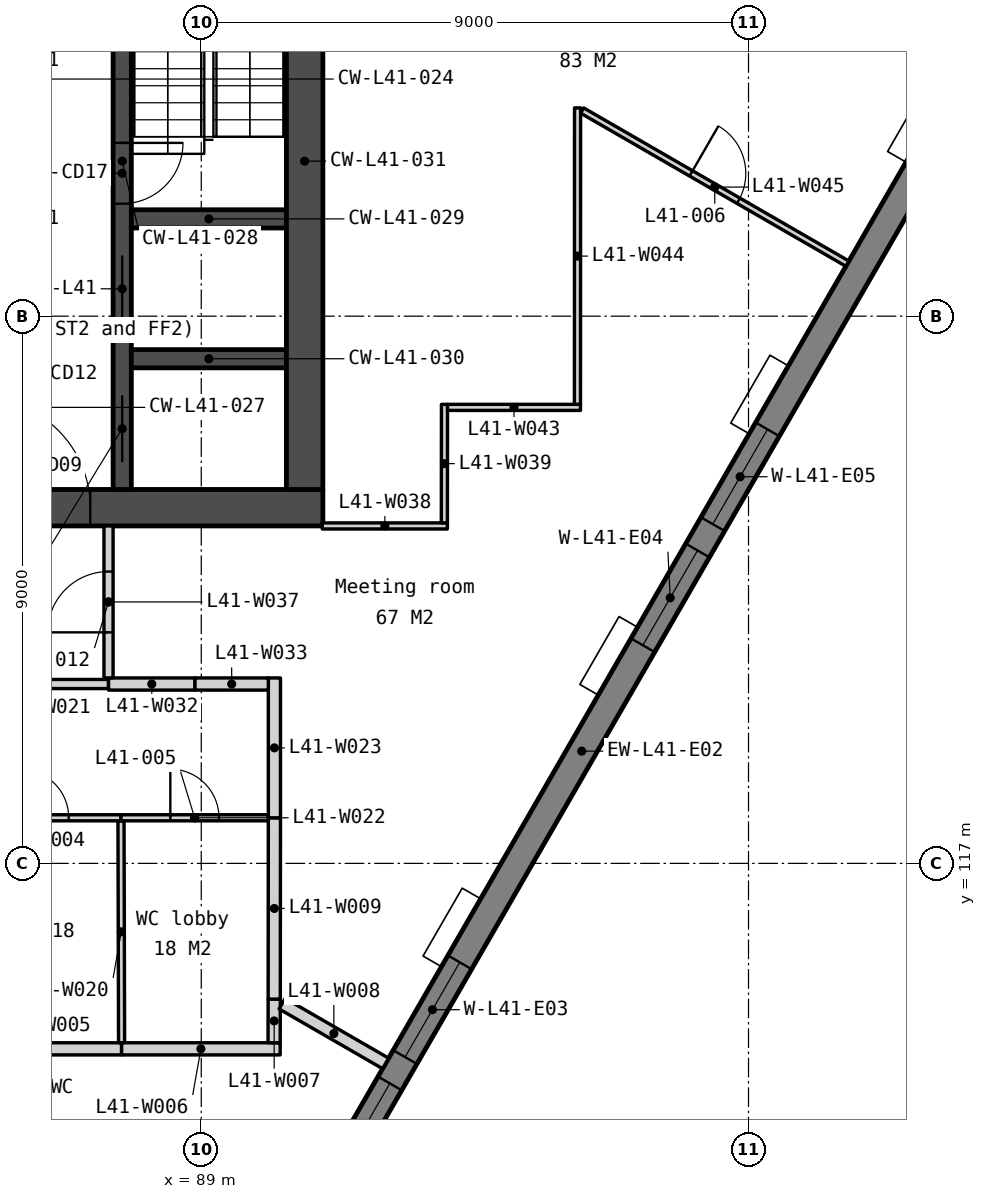
"""IFC4 building model, lengths in metres.
Left out: names, types, materials, properties, quantities, classifications, styles, units other than length and angle.
Written with IfcOpenShell. Run it as: python <this file> out.ifc"""

import sys

from ifc_helpers import new_model, si_unit, direction, frame, frame_2d, origin, place, context, subcontext, project, spatial, polyline, rectangle, outline, extrude, element, fill, save


model = new_model("IFC4")
c1 = context("Model", 3, precision=1e-05, world=origin(), true_north=direction((0.0, 1.0)))
c2 = subcontext(c1, "Body", "Model", "MODEL_VIEW")
j1 = project(units=[si_unit("LENGTHUNIT", "METRE"), si_unit("PLANEANGLEUNIT", "RADIAN")], contexts=[c1])
p1 = place(None, origin())
s1 = spatial("IfcSite", under=j1, at=p1, CompositionType="ELEMENT")
p2 = place(p1, origin())
s2 = spatial("IfcBuilding", under=s1, at=p2, CompositionType="ELEMENT")
p3 = place(p2, frame((0.0, 0.0, 163.7)))
s3 = spatial("IfcBuildingStorey", under=s2, at=p3, CompositionType="ELEMENT", Elevation=163.7)
p4 = place(p3, frame((69.0, 122.85, 0.0), z_axis=(0.0, 0.0, 1.0), x_axis=(1.0, 0.0, 0.0)))
e1 = element("IfcWall", 1, at=p4, inside=s3, PredefinedType="SOLIDWALL", context=c2, shape_type="SweptSolid", body=[
    extrude(rectangle(XDim=22.0, YDim=0.6, at=frame_2d((11.0, 0.0))), origin(), (0.0, 0.0, 1.0), 3.75),
])
p5 = place(p4, frame((16.375, 0.0, 0.0)))
e2 = element("IfcOpeningElement", 2, at=p5, cuts=e1, PredefinedType="OPENING", context=c2, shape_type="SweptSolid", body=[
    extrude(rectangle(XDim=1.8, YDim=2.1, at=frame_2d((0.9, 1.05))), frame((0.0, 0.31, 0.0), z_axis=(0.0, -1.0, 0.0), x_axis=(1.0, 0.0, 0.0)), (0.0, 0.0, 1.0), 0.62),
])
p6 = place(p4, frame((3.825, 0.0, 0.0)))
e3 = element("IfcOpeningElement", 3, at=p6, cuts=e1, PredefinedType="OPENING", context=c2, shape_type="SweptSolid", body=[
    extrude(rectangle(XDim=1.8, YDim=2.1, at=frame_2d((0.9, 1.05))), frame((0.0, 0.31, 0.0), z_axis=(0.0, -1.0, 0.0), x_axis=(1.0, 0.0, 0.0)), (0.0, 0.0, 1.0), 0.62),
])
p7 = place(p4, frame((12.85, 0.0, 0.0)))
e4 = element("IfcOpeningElement", 4, at=p7, cuts=e1, PredefinedType="OPENING", context=c2, shape_type="SweptSolid", body=[
    extrude(rectangle(XDim=1.5, YDim=2.1, at=frame_2d((0.75, 1.05))), frame((0.0, 0.31, 0.0), z_axis=(0.0, -1.0, 0.0), x_axis=(1.0, 0.0, 0.0)), (0.0, 0.0, 1.0), 0.62),
])
p8 = place(p3, frame((87.7, 133.95, 0.0), z_axis=(0.0, 0.0, 1.0), x_axis=(0.0, -1.0, 0.0)))
e5 = element("IfcWall", 5, at=p8, inside=s3, PredefinedType="SOLIDWALL", context=c2, shape_type="SweptSolid", body=[
    extrude(rectangle(XDim=10.8, YDim=0.3, at=frame_2d((5.4, 0.0))), origin(), (0.0, 0.0, 1.0), 3.75),
])
p9 = place(p8, frame((6.95, 0.0, 0.0)))
e6 = element("IfcOpeningElement", 6, at=p9, cuts=e5, PredefinedType="OPENING", context=c2, shape_type="SweptSolid", body=[
    extrude(rectangle(XDim=1.1, YDim=2.1, at=frame_2d((0.55, 1.05))), frame((0.0, 0.16, 0.0), z_axis=(0.0, -1.0, 0.0), x_axis=(1.0, 0.0, 0.0)), (0.0, 0.0, 1.0), 0.32),
])
p10 = place(p8, frame((5.1, 0.0, 0.0)))
e7 = element("IfcOpeningElement", 7, at=p10, cuts=e5, PredefinedType="OPENING", context=c2, shape_type="SweptSolid", body=[
    extrude(rectangle(XDim=1.0, YDim=2.1, at=frame_2d((0.5, 1.05))), frame((0.0, 0.16, 0.0), z_axis=(0.0, -1.0, 0.0), x_axis=(1.0, 0.0, 0.0)), (0.0, 0.0, 1.0), 0.32),
])
p11 = place(p8, frame((9.25, 0.0, 0.0)))
e8 = element("IfcOpeningElement", 8, at=p11, cuts=e5, PredefinedType="OPENING", context=c2, shape_type="SweptSolid", body=[
    extrude(rectangle(XDim=1.1, YDim=2.1, at=frame_2d((0.55, 1.05))), frame((0.0, 0.16, 0.0), z_axis=(0.0, -1.0, 0.0), x_axis=(1.0, 0.0, 0.0)), (0.0, 0.0, 1.0), 0.32),
])
for number, where, z_axis, x_axis in (
    (9, (87.85, 127.6, 0.0), (0.0, 0.0, 1.0), (1.0, 0.0, 0.0)),
    (10, (87.85, 125.3, 0.0), (0.0, 0.0, 1.0), (1.0, 0.0, 0.0)),
):
    element("IfcWall", number, at=place(p3, frame(where, z_axis=z_axis, x_axis=x_axis)), inside=s3, PredefinedType="SOLIDWALL", context=c2, shape_type="SweptSolid", body=[
        extrude(rectangle(XDim=2.55, YDim=0.3, at=frame_2d((1.275, 0.0))), origin(), (0.0, 0.0, 1.0), 3.75),
    ])
p12 = place(p3, frame((90.7, 133.95, 0.0), z_axis=(0.0, 0.0, 1.0), x_axis=(0.0, -1.0, 0.0)))
e11 = element("IfcWall", 11, at=p12, inside=s3, PredefinedType="SOLIDWALL", context=c2, shape_type="SweptSolid", body=[
    extrude(rectangle(XDim=10.8, YDim=0.6, at=frame_2d((5.4, 0.0))), origin(), (0.0, 0.0, 1.0), 3.75),
])
p13 = place(p3, frame((88.166, 106.564, -0.15), z_axis=(0.0, 0.0, 1.0), x_axis=(0.499995644604, 0.866027918359, 0.0)))
e12 = element("IfcWall", 12, at=p13, inside=s3, PredefinedType="SOLIDWALL", context=c2, shape_type="SweptSolid", body=[
    extrude(outline(polyline([(28.365, 3.9), (28.365, 0.0), (0.0, 0.0), (0.0, 3.9), (28.365, 3.9)])), frame((0.0, 0.225, 0.0), z_axis=(0.0, -1.0, 0.0), x_axis=(1.0, 0.0, 0.0)), (0.0, 0.0, 1.0), 0.45),
])
p14 = place(p13, frame((6.072, 0.0, 0.95)))
e13 = element("IfcOpeningElement", 13, at=p14, cuts=e12, PredefinedType="OPENING", context=c2, shape_type="SweptSolid", body=[
    extrude(rectangle(XDim=1.8, YDim=2.2, at=frame_2d((0.9, 1.1))), frame((0.0, 0.235, 0.0), z_axis=(0.0, -1.0, 0.0), x_axis=(1.0, 0.0, 0.0)), (0.0, 0.0, 1.0), 0.47),
])
p15 = place(p13, frame((8.372, 0.0, 0.95)))
e14 = element("IfcOpeningElement", 14, at=p15, cuts=e12, PredefinedType="OPENING", context=c2, shape_type="SweptSolid", body=[
    extrude(rectangle(XDim=1.8, YDim=2.2, at=frame_2d((0.9, 1.1))), frame((0.0, 0.235, 0.0), z_axis=(0.0, -1.0, 0.0), x_axis=(1.0, 0.0, 0.0)), (0.0, 0.0, 1.0), 0.47),
])
p16 = place(p13, frame((16.193, 0.0, 0.95)))
e15 = element("IfcOpeningElement", 15, at=p16, cuts=e12, PredefinedType="OPENING", context=c2, shape_type="SweptSolid", body=[
    extrude(rectangle(XDim=1.8, YDim=2.2, at=frame_2d((0.9, 1.1))), frame((0.0, 0.235, 0.0), z_axis=(0.0, -1.0, 0.0), x_axis=(1.0, 0.0, 0.0)), (0.0, 0.0, 1.0), 0.47),
])
p17 = place(p13, frame((18.493, 0.0, 0.95)))
e16 = element("IfcOpeningElement", 16, at=p17, cuts=e12, PredefinedType="OPENING", context=c2, shape_type="SweptSolid", body=[
    extrude(rectangle(XDim=1.8, YDim=2.2, at=frame_2d((0.9, 1.1))), frame((0.0, 0.235, 0.0), z_axis=(0.0, -1.0, 0.0), x_axis=(1.0, 0.0, 0.0)), (0.0, 0.0, 1.0), 0.47),
])
p18 = place(p13, frame((26.327, 0.0, 0.95)))
e17 = element("IfcOpeningElement", 17, at=p18, cuts=e12, PredefinedType="OPENING", context=c2, shape_type="SweptSolid", body=[
    extrude(rectangle(XDim=1.2, YDim=2.2, at=frame_2d((0.6, 1.1))), frame((0.0, 0.235, 0.0), z_axis=(0.0, -1.0, 0.0), x_axis=(1.0, 0.0, 0.0)), (0.0, 0.0, 1.0), 0.47),
])
p19 = place(p3, frame((85.15, 113.95, 0.0), z_axis=(0.0, 0.0, 1.0), x_axis=(1.0, 0.0, 0.0)))
e18 = element("IfcWall", 18, at=p19, inside=s3, PredefinedType="PARTITIONING", context=c2, shape_type="SweptSolid", body=[
    extrude(rectangle(XDim=2.54, YDim=0.2, at=frame_2d((1.27, 0.0))), origin(), (0.0, 0.0, 1.0), 3.75),
])
p20 = place(p3, frame((87.69, 113.95, 0.0), z_axis=(0.0, 0.0, 1.0), x_axis=(1.0, 0.0, 0.0)))
e19 = element("IfcWall", 19, at=p20, inside=s3, PredefinedType="PARTITIONING", context=c2, shape_type="SweptSolid", body=[
    extrude(rectangle(XDim=2.608, YDim=0.2, at=frame_2d((1.304, 0.0))), origin(), (0.0, 0.0, 1.0), 3.75),
])
p21 = place(p3, frame((90.198, 114.05, 0.0), z_axis=(0.0, 0.0, 1.0), x_axis=(0.002380945632, 0.999997165545, 0.0)))
e20 = element("IfcWall", 20, at=p21, inside=s3, PredefinedType="PARTITIONING", context=c2, shape_type="SweptSolid", body=[
    extrude(rectangle(XDim=0.718, YDim=0.2, at=frame_2d((0.359, 0.0))), origin(), (0.0, 0.0, 1.0), 3.75),
])
p22 = place(p3, frame((90.33, 114.693, 0.0), z_axis=(0.0, 0.0, 1.0), x_axis=(0.866009734793, -0.500027138508, 0.0)))
e21 = element("IfcWall", 21, at=p22, inside=s3, PredefinedType="PARTITIONING", context=c2, shape_type="SweptSolid", body=[
    extrude(rectangle(XDim=1.965, YDim=0.2, at=frame_2d((0.983, 0.0))), origin(), (0.0, 0.0, 1.0), 3.75),
])
p23 = place(p3, frame((90.2, 114.768, 0.0), z_axis=(0.0, 0.0, 1.0), x_axis=(0.000982398216, 0.999999517447, 0.0)))
e22 = element("IfcWall", 22, at=p23, inside=s3, PredefinedType="PARTITIONING", context=c2, shape_type="SweptSolid", body=[
    extrude(rectangle(XDim=2.982, YDim=0.2, at=frame_2d((1.491, 0.0))), origin(), (0.0, 0.0, 1.0), 3.75),
])
p24 = place(p3, frame((87.69, 114.05, 0.0), z_axis=(0.0, 0.0, 1.0), x_axis=(-0.002608686776, 0.999996597371, 0.0)))
e23 = element("IfcWall", 23, at=p24, inside=s3, PredefinedType="PARTITIONING", context=c2, shape_type="SweptSolid", body=[
    extrude(rectangle(XDim=3.65, YDim=0.1, at=frame_2d((1.825, 0.0))), origin(), (0.0, 0.0, 1.0), 3.75),
])
p25 = place(p3, frame((85.16, 117.75, 0.0), z_axis=(0.0, 0.0, 1.0), x_axis=(1.0, 0.0, 0.0)))
e24 = element("IfcWall", 24, at=p25, inside=s3, PredefinedType="PARTITIONING", context=c2, shape_type="SweptSolid", body=[
    extrude(rectangle(XDim=2.52, YDim=0.1, at=frame_2d((1.26, 0.0))), origin(), (0.0, 0.0, 1.0), 3.75),
])
p26 = place(p25, frame((0.86, 0.0, 0.0)))
e25 = element("IfcOpeningElement", 25, at=p26, cuts=e24, PredefinedType="OPENING", context=c2, shape_type="SweptSolid", body=[
    extrude(rectangle(XDim=0.8, YDim=2.1, at=frame_2d((0.4, 1.05))), frame((0.0, 0.06, 0.0), z_axis=(0.0, -1.0, 0.0), x_axis=(1.0, 0.0, 0.0)), (0.0, 0.0, 1.0), 0.12),
])
p27 = place(p3, frame((87.68, 117.75, 0.0), z_axis=(0.0, 0.0, 1.0), x_axis=(1.0, 0.0, 0.0)))
e26 = element("IfcWall", 26, at=p27, inside=s3, PredefinedType="PARTITIONING", context=c2, shape_type="SweptSolid", body=[
    extrude(rectangle(XDim=2.423, YDim=0.1, at=frame_2d((1.211, 0.0))), origin(), (0.0, 0.0, 1.0), 3.75),
])
p28 = place(p27, frame((0.812, 0.0, 0.0)))
e27 = element("IfcOpeningElement", 27, at=p28, cuts=e26, PredefinedType="OPENING", context=c2, shape_type="SweptSolid", body=[
    extrude(rectangle(XDim=0.8, YDim=2.1, at=frame_2d((0.4, 1.05))), frame((0.0, 0.06, 0.0), z_axis=(0.0, -1.0, 0.0), x_axis=(1.0, 0.0, 0.0)), (0.0, 0.0, 1.0), 0.12),
])
p29 = place(p3, frame((90.203, 117.75, 0.0), z_axis=(0.0, 0.0, 1.0), x_axis=(0.0, 1.0, 0.0)))
e28 = element("IfcWall", 28, at=p29, inside=s3, PredefinedType="PARTITIONING", context=c2, shape_type="SweptSolid", body=[
    extrude(rectangle(XDim=2.3, YDim=0.2, at=frame_2d((1.15, 0.0))), origin(), (0.0, 0.0, 1.0), 3.75),
])
p30 = place(p3, frame((81.275, 119.95, 0.0), z_axis=(0.0, 0.0, 1.0), x_axis=(1.0, 0.0, 0.0)))
e29 = element("IfcWall", 29, at=p30, inside=s3, PredefinedType="PARTITIONING", context=c2, shape_type="SweptSolid", body=[
    extrude(rectangle(XDim=6.2, YDim=0.15, at=frame_2d((3.1, 0.0))), origin(), (0.0, 0.0, 1.0), 3.75),
])
p31 = place(p30, frame((2.6, 0.0, 0.0)))
e30 = element("IfcOpeningElement", 30, at=p31, cuts=e29, PredefinedType="OPENING", context=c2, shape_type="SweptSolid", body=[
    extrude(rectangle(XDim=1.0, YDim=2.1, at=frame_2d((0.5, 1.05))), frame((0.0, 0.085, 0.0), z_axis=(0.0, -1.0, 0.0), x_axis=(1.0, 0.0, 0.0)), (0.0, 0.0, 1.0), 0.17),
])
p32 = place(p3, frame((87.475, 119.95, 0.0), z_axis=(0.0, 0.0, 1.0), x_axis=(1.0, 0.0, 0.0)))
e31 = element("IfcWall", 31, at=p32, inside=s3, PredefinedType="PARTITIONING", context=c2, shape_type="SweptSolid", body=[
    extrude(rectangle(XDim=1.422, YDim=0.2, at=frame_2d((0.711, 0.0))), origin(), (0.0, 0.0, 1.0), 3.75),
])
p33 = place(p3, frame((88.897, 119.95, 0.0), z_axis=(0.0, 0.0, 1.0), x_axis=(1.0, 0.0, 0.0)))
e32 = element("IfcWall", 32, at=p33, inside=s3, PredefinedType="PARTITIONING", context=c2, shape_type="SweptSolid", body=[
    extrude(rectangle(XDim=1.206, YDim=0.2, at=frame_2d((0.603, 0.0))), origin(), (0.0, 0.0, 1.0), 3.75),
])
p34 = place(p3, frame((87.475, 120.05, 0.0), z_axis=(0.0, 0.0, 1.0), x_axis=(0.0, 1.0, 0.0)))
e33 = element("IfcWall", 33, at=p34, inside=s3, PredefinedType="PARTITIONING", context=c2, shape_type="SweptSolid", body=[
    extrude(rectangle(XDim=2.5, YDim=0.15, at=frame_2d((1.25, 0.0))), origin(), (0.0, 0.0, 1.0), 3.75),
])
p35 = place(p34, frame((0.75, 0.0, 0.0)))
e34 = element("IfcOpeningElement", 34, at=p35, cuts=e33, PredefinedType="OPENING", context=c2, shape_type="SweptSolid", body=[
    extrude(rectangle(XDim=1.0, YDim=2.1, at=frame_2d((0.5, 1.05))), frame((0.0, 0.085, 0.0), z_axis=(0.0, -1.0, 0.0), x_axis=(1.0, 0.0, 0.0)), (0.0, 0.0, 1.0), 0.17),
])
p36 = place(p3, frame((90.99, 122.55, 0.0), z_axis=(0.0, 0.0, 1.0), x_axis=(1.0, 0.0, 0.0)))
e35 = element("IfcWall", 35, at=p36, inside=s3, PredefinedType="PARTITIONING", context=c2, shape_type="SweptSolid", body=[
    extrude(rectangle(XDim=2.058, YDim=0.1, at=frame_2d((1.029, 0.0))), origin(), (0.0, 0.0, 1.0), 3.75),
])
p37 = place(p3, frame((92.998, 122.6, 0.0), z_axis=(0.0, 0.0, 1.0), x_axis=(0.001001752565, 0.999999498246, 0.0)))
e36 = element("IfcWall", 36, at=p37, inside=s3, PredefinedType="PARTITIONING", context=c2, shape_type="SweptSolid", body=[
    extrude(rectangle(XDim=1.95, YDim=0.1, at=frame_2d((0.975, 0.0))), origin(), (0.0, 0.0, 1.0), 3.75),
])
p38 = place(p3, frame((93.05, 124.5, 0.0), z_axis=(0.0, 0.0, 1.0), x_axis=(1.0, 0.0, 0.0)))
e37 = element("IfcWall", 37, at=p38, inside=s3, PredefinedType="PARTITIONING", context=c2, shape_type="SweptSolid", body=[
    extrude(rectangle(XDim=2.187, YDim=0.1, at=frame_2d((1.093, 0.0))), origin(), (0.0, 0.0, 1.0), 3.75),
])
p39 = place(p3, frame((95.187, 124.55, 0.0), z_axis=(0.0, 0.0, 1.0), x_axis=(0.000450630837, 0.999999898466, 0.0)))
e38 = element("IfcWall", 38, at=p39, inside=s3, PredefinedType="PARTITIONING", context=c2, shape_type="SweptSolid", body=[
    extrude(rectangle(XDim=4.876, YDim=0.1, at=frame_2d((2.438, 0.0))), origin(), (0.0, 0.0, 1.0), 3.75),
])
p40 = place(p3, frame((95.264, 129.383, 0.0), z_axis=(0.0, 0.0, 1.0), x_axis=(0.866027389382, -0.499996560828, 0.0)))
e39 = element("IfcWall", 39, at=p40, inside=s3, PredefinedType="PARTITIONING", context=c2, shape_type="SweptSolid", body=[
    extrude(rectangle(XDim=5.037, YDim=0.1, at=frame_2d((2.519, 0.0))), origin(), (0.0, 0.0, 1.0), 3.75),
])
p41 = place(p40, frame((2.069, 0.0, 0.0)))
e40 = element("IfcOpeningElement", 40, at=p41, cuts=e39, PredefinedType="OPENING", context=c2, shape_type="SweptSolid", body=[
    extrude(rectangle(XDim=0.9, YDim=2.1, at=frame_2d((0.45, 1.05))), frame((0.0, 0.06, 0.0), z_axis=(0.0, -1.0, 0.0), x_axis=(1.0, 0.0, 0.0)), (0.0, 0.0, 1.0), 0.12),
])
p42 = place(p9, origin())
e41 = element("IfcDoor", 41, at=p42, inside=s3, OperationType="SLIDING_TO_LEFT", PredefinedType="DOOR", context=c2, shape_type="SweptSolid", body=[
    extrude(rectangle(XDim=1.1, YDim=2.1, at=frame_2d((0.55, 1.05))), frame((0.0, 0.025, 0.0), z_axis=(0.0, -1.0, 0.0), x_axis=(1.0, 0.0, 0.0)), (0.0, 0.0, 1.0), 0.05),
])
fill(e6, e41)
p43 = place(p5, origin())
e42 = element("IfcDoor", 42, at=p43, inside=s3, OperationType="DOUBLE_DOOR_DOUBLE_SWING", PredefinedType="DOOR", context=c2, shape_type="SweptSolid", body=[
    extrude(rectangle(XDim=1.8, YDim=2.1, at=frame_2d((0.9, 1.05))), frame((0.0, 0.025, 0.0), z_axis=(0.0, -1.0, 0.0), x_axis=(1.0, 0.0, 0.0)), (0.0, 0.0, 1.0), 0.05),
])
fill(e2, e42)
p44 = place(p10, origin())
e43 = element("IfcDoor", 43, at=p44, inside=s3, OperationType="SINGLE_SWING_LEFT", PredefinedType="DOOR", context=c2, shape_type="SweptSolid", body=[
    extrude(rectangle(XDim=1.0, YDim=2.1, at=frame_2d((0.5, 1.05))), frame((0.0, 0.025, 0.0), z_axis=(0.0, -1.0, 0.0), x_axis=(1.0, 0.0, 0.0)), (0.0, 0.0, 1.0), 0.05),
])
fill(e7, e43)
p45 = place(p11, origin())
e44 = element("IfcDoor", 44, at=p45, inside=s3, OperationType="SLIDING_TO_LEFT", PredefinedType="DOOR", context=c2, shape_type="SweptSolid", body=[
    extrude(rectangle(XDim=1.1, YDim=2.1, at=frame_2d((0.55, 1.05))), frame((0.0, 0.025, 0.0), z_axis=(0.0, -1.0, 0.0), x_axis=(1.0, 0.0, 0.0)), (0.0, 0.0, 1.0), 0.05),
])
fill(e8, e44)
p46 = place(p14, origin())
e45 = element("IfcWindow", 45, at=p46, inside=s3, PartitioningType="SINGLE_PANEL", PredefinedType="WINDOW", context=c2, shape_type="SweptSolid", body=[
    extrude(rectangle(XDim=1.8, YDim=2.2, at=frame_2d((0.9, 1.1))), frame((0.0, 0.03, 0.0), z_axis=(0.0, -1.0, 0.0), x_axis=(1.0, 0.0, 0.0)), (0.0, 0.0, 1.0), 0.06),
])
fill(e13, e45)
p47 = place(p15, origin())
e46 = element("IfcWindow", 46, at=p47, inside=s3, PartitioningType="SINGLE_PANEL", PredefinedType="WINDOW", context=c2, shape_type="SweptSolid", body=[
    extrude(rectangle(XDim=1.8, YDim=2.2, at=frame_2d((0.9, 1.1))), frame((0.0, 0.03, 0.0), z_axis=(0.0, -1.0, 0.0), x_axis=(1.0, 0.0, 0.0)), (0.0, 0.0, 1.0), 0.06),
])
fill(e14, e46)
p48 = place(p16, origin())
e47 = element("IfcWindow", 47, at=p48, inside=s3, PartitioningType="SINGLE_PANEL", PredefinedType="WINDOW", context=c2, shape_type="SweptSolid", body=[
    extrude(rectangle(XDim=1.8, YDim=2.2, at=frame_2d((0.9, 1.1))), frame((0.0, 0.03, 0.0), z_axis=(0.0, -1.0, 0.0), x_axis=(1.0, 0.0, 0.0)), (0.0, 0.0, 1.0), 0.06),
])
fill(e15, e47)
p49 = place(p17, origin())
e48 = element("IfcWindow", 48, at=p49, inside=s3, PartitioningType="SINGLE_PANEL", PredefinedType="WINDOW", context=c2, shape_type="SweptSolid", body=[
    extrude(rectangle(XDim=1.8, YDim=2.2, at=frame_2d((0.9, 1.1))), frame((0.0, 0.03, 0.0), z_axis=(0.0, -1.0, 0.0), x_axis=(1.0, 0.0, 0.0)), (0.0, 0.0, 1.0), 0.06),
])
fill(e16, e48)
p50 = place(p26, origin())
e49 = element("IfcDoor", 49, at=p50, inside=s3, OperationType="SINGLE_SWING_LEFT", PredefinedType="DOOR", context=c2, shape_type="SweptSolid", body=[
    extrude(rectangle(XDim=0.8, YDim=2.1, at=frame_2d((0.4, 1.05))), frame((0.0, 0.025, 0.0), z_axis=(0.0, -1.0, 0.0), x_axis=(1.0, 0.0, 0.0)), (0.0, 0.0, 1.0), 0.05),
])
fill(e25, e49)
p51 = place(p28, origin())
e50 = element("IfcDoor", 50, at=p51, inside=s3, OperationType="SINGLE_SWING_LEFT", PredefinedType="DOOR", context=c2, shape_type="SweptSolid", body=[
    extrude(rectangle(XDim=0.8, YDim=2.1, at=frame_2d((0.4, 1.05))), frame((0.0, 0.025, 0.0), z_axis=(0.0, -1.0, 0.0), x_axis=(1.0, 0.0, 0.0)), (0.0, 0.0, 1.0), 0.05),
])
fill(e27, e50)
p52 = place(p41, origin())
e51 = element("IfcDoor", 51, at=p52, inside=s3, OperationType="SINGLE_SWING_LEFT", PredefinedType="DOOR", context=c2, shape_type="SweptSolid", body=[
    extrude(rectangle(XDim=0.9, YDim=2.1, at=frame_2d((0.45, 1.05))), frame((0.0, 0.025, 0.0), z_axis=(0.0, -1.0, 0.0), x_axis=(1.0, 0.0, 0.0)), (0.0, 0.0, 1.0), 0.05),
])
fill(e40, e51)
p53 = place(p35, origin())
e52 = element("IfcDoor", 52, at=p53, inside=s3, OperationType="SINGLE_SWING_LEFT", PredefinedType="DOOR", context=c2, shape_type="SweptSolid", body=[
    extrude(rectangle(XDim=1.0, YDim=2.1, at=frame_2d((0.5, 1.05))), frame((0.0, 0.025, 0.0), z_axis=(0.0, -1.0, 0.0), x_axis=(1.0, 0.0, 0.0)), (0.0, 0.0, 1.0), 0.05),
])
fill(e34, e52)
save(model, sys.argv[1])
